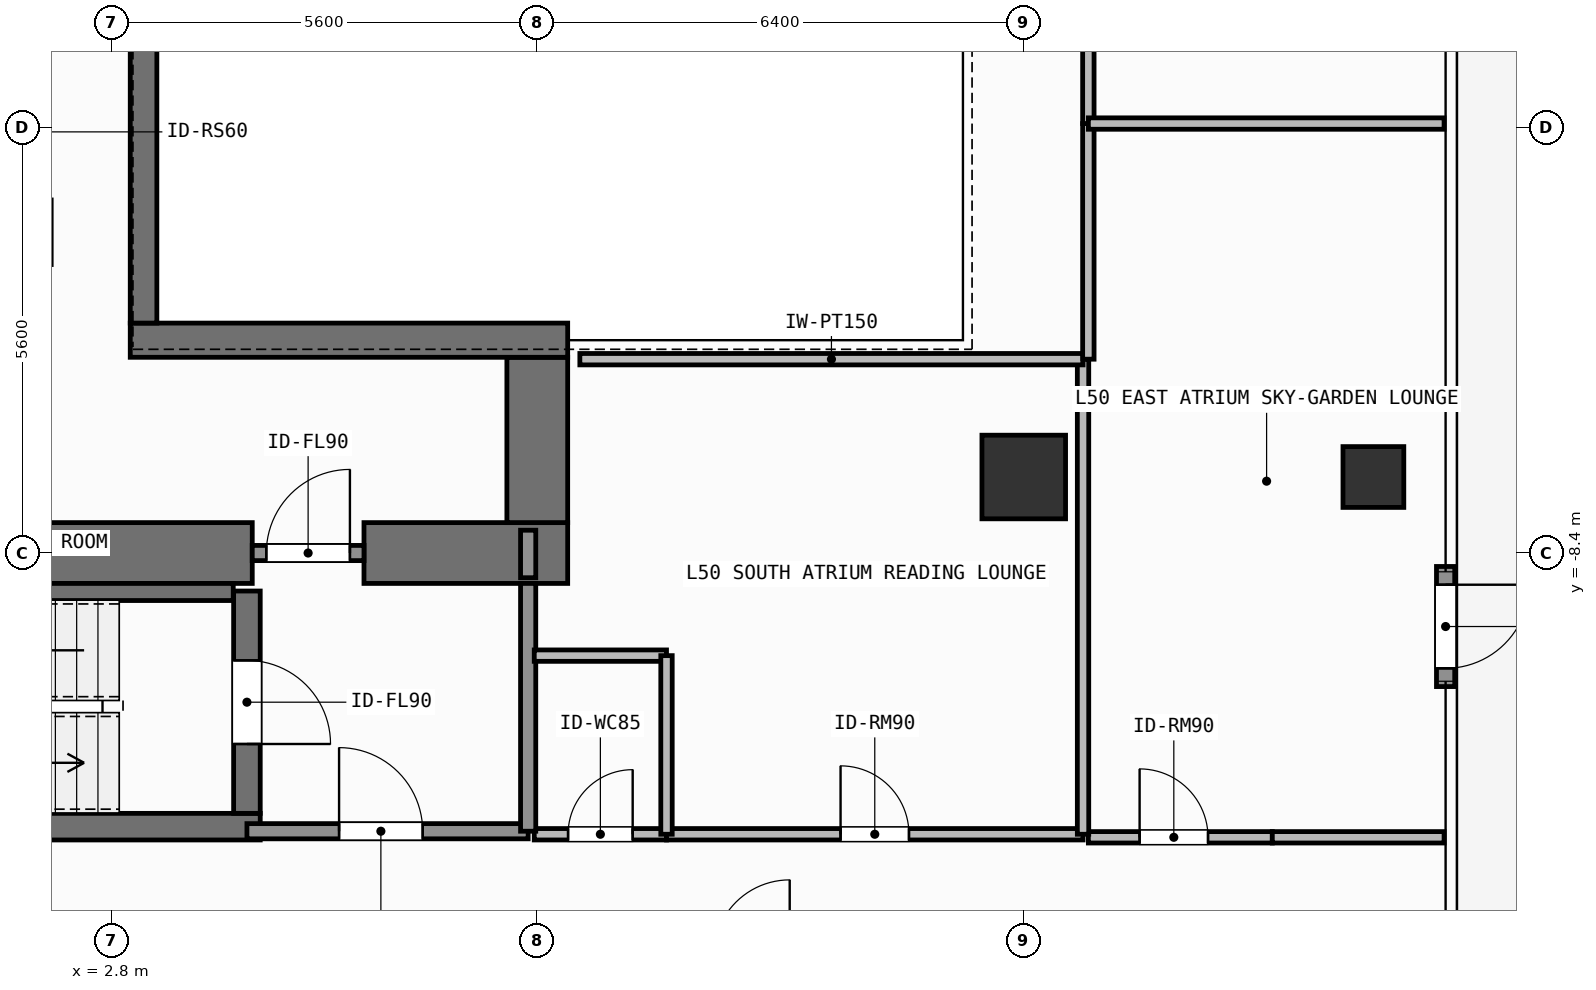
"""IFC4 building model, lengths in metres.
Left out: names, types, materials, properties, quantities, classifications, styles, units other than length and angle.
Written with IfcOpenShell. Run it as: python <this file> out.ifc"""

import sys

from ifc_helpers import new_model, si_unit, direction, frame, frame_2d, origin, origin_2d, place, context, subcontext, project, spatial, rectangle, hollow_rectangle, extrude, element, fill, save


model = new_model("IFC4")
c1 = context("Model", 3, precision=1e-05, world=origin(), true_north=direction((0.0, 1.0)))
c2 = subcontext(c1, "Body", "Model", "MODEL_VIEW")
j1 = project(units=[si_unit("LENGTHUNIT", "METRE"), si_unit("PLANEANGLEUNIT", "RADIAN")], contexts=[c1])
p1 = place(None, origin())
s1 = spatial("IfcSite", under=j1, at=p1, CompositionType="ELEMENT")
p2 = place(p1, origin())
s2 = spatial("IfcBuilding", under=s1, at=p2, CompositionType="ELEMENT")
p3 = place(p2, frame((0.0, 0.0, 203.1)))
s3 = spatial("IfcBuildingStorey", under=s2, at=p3, CompositionType="ELEMENT", Elevation=203.1)
p4 = place(p3, frame((-2.62, -8.4, 0.0), z_axis=(0.0, 0.0, 1.0), x_axis=(1.0, 0.0, 0.0)))
e1 = element("IfcWall", 1, at=p4, inside=s3, PredefinedType="SHEAR", context=c2, shape_type="SweptSolid", body=[
    extrude(rectangle(XDim=7.27, YDim=0.8, at=frame_2d((3.635, 0.0))), origin(), (0.0, 0.0, 1.0), 3.9),
])
p5 = place(p3, frame((6.12, -8.4, 0.0), z_axis=(0.0, 0.0, 1.0), x_axis=(1.0, 0.0, 0.0)))
e2 = element("IfcWall", 2, at=p5, inside=s3, PredefinedType="SHEAR", context=c2, shape_type="SweptSolid", body=[
    extrude(rectangle(XDim=2.68, YDim=0.8, at=frame_2d((1.34, 0.0))), origin(), (0.0, 0.0, 1.0), 3.9),
])
p6 = place(p3, frame((8.4, -8.0, 0.0), z_axis=(0.0, 0.0, 1.0), x_axis=(0.0, 1.0, 0.0)))
e3 = element("IfcWall", 3, at=p6, inside=s3, PredefinedType="SHEAR", context=c2, shape_type="SweptSolid", body=[
    extrude(rectangle(XDim=2.175, YDim=0.8, at=frame_2d((1.087, 0.0))), origin(), (0.0, 0.0, 1.0), 3.9),
])
p7 = place(p3, frame((3.045, -5.6, 0.0), z_axis=(0.0, 0.0, 1.0), x_axis=(1.0, 0.0, 0.0)))
e4 = element("IfcWall", 4, at=p7, inside=s3, PredefinedType="SHEAR", context=c2, shape_type="SweptSolid", body=[
    extrude(rectangle(XDim=5.755, YDim=0.45, at=frame_2d((2.877, 0.0))), origin(), (0.0, 0.0, 1.0), 3.9),
])
p8 = place(p3, frame((3.22, -5.375, 0.0), z_axis=(0.0, 0.0, 1.0), x_axis=(0.0, 1.0, 0.0)))
e5 = element("IfcWall", 5, at=p8, inside=s3, PredefinedType="SHEAR", context=c2, shape_type="SweptSolid", body=[
    extrude(rectangle(XDim=10.75, YDim=0.35, at=frame_2d((5.375, 0.0))), origin(), (0.0, 0.0, 1.0), 3.9),
])
p9 = place(p3, frame((-2.555, -12.0, 0.0), z_axis=(0.0, 0.0, 1.0), x_axis=(1.0, 0.0, 0.0)))
e6 = element("IfcWall", 6, at=p9, inside=s3, PredefinedType="SHEAR", context=c2, shape_type="SweptSolid", body=[
    extrude(rectangle(XDim=7.31, YDim=0.35, at=frame_2d((3.655, 0.0))), origin(), (0.0, 0.0, 1.0), 3.9),
])
p10 = place(p3, frame((-2.2, -8.913, 0.0), z_axis=(0.0, 0.0, 1.0), x_axis=(1.0, 0.0, 0.0)))
e7 = element("IfcWall", 7, at=p10, inside=s3, PredefinedType="SHEAR", context=c2, shape_type="SweptSolid", body=[
    extrude(rectangle(XDim=6.6, YDim=0.225, at=frame_2d((3.3, 0.0))), origin(), (0.0, 0.0, 1.0), 3.9),
])
p11 = place(p3, frame((4.58, -8.9, 0.0), z_axis=(0.0, 0.0, 1.0), x_axis=(0.0, -1.0, 0.0)))
e8 = element("IfcWall", 8, at=p11, inside=s3, PredefinedType="SHEAR", context=c2, shape_type="SweptSolid", body=[
    extrude(rectangle(XDim=2.925, YDim=0.35, at=frame_2d((1.462, 0.0))), origin(), (0.0, 0.0, 1.0), 3.9),
])
p12 = place(p11, frame((0.913, 0.0, 0.0)))
e9 = element("IfcOpeningElement", 9, at=p12, cuts=e8, PredefinedType="OPENING", context=c2, shape_type="SweptSolid", body=[
    extrude(rectangle(XDim=1.1, YDim=2.15, at=frame_2d((0.55, 1.075))), frame((0.0, 0.185, 0.0), z_axis=(0.0, -1.0, 0.0), x_axis=(1.0, 0.0, 0.0)), (0.0, 0.0, 1.0), 0.37),
])
p13 = place(p3, frame((14.8, -7.4, 0.0), z_axis=(0.0, 0.0, 1.0), x_axis=(1.0, 0.0, 0.0)))
e10 = element("IfcColumn", 10, at=p13, inside=s3, PredefinedType="COLUMN", context=c2, shape_type="SweptSolid", body=[
    extrude(rectangle(XDim=1.1, YDim=1.1, at=origin_2d()), origin(), (0.0, 0.0, 1.0), 3.9),
])
p14 = place(p3, frame((19.4, -7.4, 0.0), z_axis=(0.0, 0.0, 1.0), x_axis=(1.0, 0.0, 0.0)))
e11 = element("IfcColumn", 11, at=p14, inside=s3, PredefinedType="COLUMN", context=c2, shape_type="SweptSolid", body=[
    extrude(hollow_rectangle(XDim=0.8, YDim=0.8, WallThickness=0.036, at=origin_2d()), origin(), (0.0, 0.0, 1.0), 3.9),
])
p15 = place(p3, frame((20.35, -8.577, 0.0), z_axis=(0.0, 0.0, 1.0), x_axis=(0.0, -1.0, 0.0)))
e12 = element("IfcWall", 12, at=p15, inside=s3, PredefinedType="SOLIDWALL", context=c2, shape_type="SweptSolid", body=[
    extrude(rectangle(XDim=1.58, YDim=0.24, at=frame_2d((0.79, 0.0))), origin(), (0.0, 0.0, 1.0), 3.68),
])
p16 = place(p15, frame((0.24, 0.0, 0.0)))
e13 = element("IfcOpeningElement", 13, at=p16, cuts=e12, PredefinedType="OPENING", context=c2, shape_type="SweptSolid", body=[
    extrude(rectangle(XDim=1.1, YDim=2.2, at=frame_2d((0.55, 1.1))), frame((0.0, 0.13, 0.0), z_axis=(0.0, -1.0, 0.0), x_axis=(1.0, 0.0, 0.0)), (0.0, 0.0, 1.0), 0.26),
])
p17 = place(p3, frame((4.58, -12.06, 0.0), z_axis=(0.0, 0.0, 1.0), x_axis=(1.0, 0.0, 0.0)))
e14 = element("IfcWall", 14, at=p17, inside=s3, PredefinedType="SOLIDWALL", context=c2, shape_type="SweptSolid", body=[
    extrude(rectangle(XDim=3.7, YDim=0.2, at=frame_2d((1.85, 0.0))), origin(), (0.0, 0.0, 1.0), 3.68),
])
p18 = place(p17, frame((1.212, 0.0, 0.0)))
e15 = element("IfcOpeningElement", 15, at=p18, cuts=e14, PredefinedType="OPENING", context=c2, shape_type="SweptSolid", body=[
    extrude(rectangle(XDim=1.1, YDim=2.15, at=frame_2d((0.55, 1.075))), frame((0.0, 0.11, 0.0), z_axis=(0.0, -1.0, 0.0), x_axis=(1.0, 0.0, 0.0)), (0.0, 0.0, 1.0), 0.22),
])
p19 = place(p3, frame((4.65, -8.4, 0.0), z_axis=(0.0, 0.0, 1.0), x_axis=(1.0, 0.0, 0.0)))
e16 = element("IfcWall", 16, at=p19, inside=s3, PredefinedType="SOLIDWALL", context=c2, shape_type="SweptSolid", body=[
    extrude(rectangle(XDim=1.47, YDim=0.2, at=frame_2d((0.735, 0.0))), origin(), (0.0, 0.0, 1.0), 2.82),
])
p20 = place(p19, frame((0.185, 0.0, 0.0)))
e17 = element("IfcOpeningElement", 17, at=p20, cuts=e16, PredefinedType="OPENING", context=c2, shape_type="SweptSolid", body=[
    extrude(rectangle(XDim=1.1, YDim=2.15, at=frame_2d((0.55, 1.075))), frame((0.0, 0.11, 0.0), z_axis=(0.0, -1.0, 0.0), x_axis=(1.0, 0.0, 0.0)), (0.0, 0.0, 1.0), 0.22),
])
p21 = place(p3, frame((8.36, -12.1, 0.0), z_axis=(0.0, 0.0, 1.0), x_axis=(1.0, 0.0, 0.0)))
e18 = element("IfcWall", 18, at=p21, inside=s3, PredefinedType="PARTITIONING", context=c2, shape_type="SweptSolid", body=[
    extrude(rectangle(XDim=1.74, YDim=0.15, at=frame_2d((0.87, 0.0))), origin(), (0.0, 0.0, 1.0), 3.68),
])
p22 = place(p21, frame((0.445, 0.0, 0.0)))
e19 = element("IfcOpeningElement", 19, at=p22, cuts=e18, PredefinedType="OPENING", context=c2, shape_type="SweptSolid", body=[
    extrude(rectangle(XDim=0.85, YDim=2.1, at=frame_2d((0.425, 1.05))), frame((0.0, 0.085, 0.0), z_axis=(0.0, -1.0, 0.0), x_axis=(1.0, 0.0, 0.0)), (0.0, 0.0, 1.0), 0.17),
])
p23 = place(p3, frame((10.1, -12.1, 0.0), z_axis=(0.0, 0.0, 1.0), x_axis=(1.0, 0.0, 0.0)))
e20 = element("IfcWall", 20, at=p23, inside=s3, PredefinedType="PARTITIONING", context=c2, shape_type="SweptSolid", body=[
    extrude(rectangle(XDim=5.48, YDim=0.15, at=frame_2d((2.74, 0.0))), origin(), (0.0, 0.0, 1.0), 3.68),
])
p24 = place(p23, frame((2.29, 0.0, 0.0)))
e21 = element("IfcOpeningElement", 21, at=p24, cuts=e20, PredefinedType="OPENING", context=c2, shape_type="SweptSolid", body=[
    extrude(rectangle(XDim=0.9, YDim=2.1, at=frame_2d((0.45, 1.05))), frame((0.0, 0.085, 0.0), z_axis=(0.0, -1.0, 0.0), x_axis=(1.0, 0.0, 0.0)), (0.0, 0.0, 1.0), 0.17),
])
p25 = place(p3, frame((15.65, -12.14, 0.0), z_axis=(0.0, 0.0, 1.0), x_axis=(1.0, 0.0, 0.0)))
e22 = element("IfcWall", 22, at=p25, inside=s3, PredefinedType="PARTITIONING", context=c2, shape_type="SweptSolid", body=[
    extrude(rectangle(XDim=2.42, YDim=0.15, at=frame_2d((1.21, 0.0))), origin(), (0.0, 0.0, 1.0), 3.68),
])
p26 = place(p25, frame((0.674, 0.0, 0.0)))
e23 = element("IfcOpeningElement", 23, at=p26, cuts=e22, PredefinedType="OPENING", context=c2, shape_type="SweptSolid", body=[
    extrude(rectangle(XDim=0.9, YDim=2.1, at=frame_2d((0.45, 1.05))), frame((0.0, 0.085, 0.0), z_axis=(0.0, -1.0, 0.0), x_axis=(1.0, 0.0, 0.0)), (0.0, 0.0, 1.0), 0.17),
])
p27 = place(p3, frame((8.28, -12.06, 0.0), z_axis=(0.0, 0.0, 1.0), x_axis=(0.0, 1.0, 0.0)))
e24 = element("IfcWall", 24, at=p27, inside=s3, PredefinedType="SOLIDWALL", context=c2, shape_type="SweptSolid", body=[
    extrude(rectangle(XDim=3.26, YDim=0.2, at=frame_2d((1.63, 0.0))), origin(), (0.0, 0.0, 1.0), 3.68),
])
p28 = place(p3, frame((8.28, -8.725, 0.0), z_axis=(0.0, 0.0, 1.0), x_axis=(0.0, 1.0, 0.0)))
e25 = element("IfcWall", 25, at=p28, inside=s3, PredefinedType="SOLIDWALL", context=c2, shape_type="SweptSolid", body=[
    extrude(rectangle(XDim=0.625, YDim=0.2, at=frame_2d((0.312, 0.0))), origin(), (0.0, 0.0, 1.0), 3.68),
])
p29 = place(p3, frame((8.36, -9.75, 0.0), z_axis=(0.0, 0.0, 1.0), x_axis=(1.0, 0.0, 0.0)))
e26 = element("IfcWall", 26, at=p29, inside=s3, PredefinedType="PARTITIONING", context=c2, shape_type="SweptSolid", body=[
    extrude(rectangle(XDim=1.74, YDim=0.15, at=frame_2d((0.87, 0.0))), origin(), (0.0, 0.0, 1.0), 3.68),
])
p30 = place(p3, frame((10.1, -12.1, 0.0), z_axis=(0.0, 0.0, 1.0), x_axis=(0.0, 1.0, 0.0)))
e27 = element("IfcWall", 27, at=p30, inside=s3, PredefinedType="PARTITIONING", context=c2, shape_type="SweptSolid", body=[
    extrude(rectangle(XDim=2.35, YDim=0.15, at=frame_2d((1.175, 0.0))), origin(), (0.0, 0.0, 1.0), 3.68),
])
p31 = place(p3, frame((15.58, -12.1, 0.0), z_axis=(0.0, 0.0, 1.0), x_axis=(0.0, 1.0, 0.0)))
e28 = element("IfcWall", 28, at=p31, inside=s3, PredefinedType="PARTITIONING", context=c2, shape_type="SweptSolid", body=[
    extrude(rectangle(XDim=6.25, YDim=0.15, at=frame_2d((3.125, 0.0))), origin(), (0.0, 0.0, 1.0), 3.68),
])
p32 = place(p3, frame((8.96, -5.85, 0.0), z_axis=(0.0, 0.0, 1.0), x_axis=(1.0, 0.0, 0.0)))
e29 = element("IfcWall", 29, at=p32, inside=s3, PredefinedType="PARTITIONING", context=c2, shape_type="SweptSolid", body=[
    extrude(rectangle(XDim=6.62, YDim=0.15, at=frame_2d((3.31, 0.0))), origin(), (0.0, 0.0, 1.0), 3.68),
])
p33 = place(p3, frame((15.65, -5.85, 0.0), z_axis=(0.0, 0.0, 1.0), x_axis=(0.0, 1.0, 0.0)))
e30 = element("IfcWall", 30, at=p33, inside=s3, PredefinedType="PARTITIONING", context=c2, shape_type="SweptSolid", body=[
    extrude(rectangle(XDim=3.1, YDim=0.15, at=frame_2d((1.55, 0.0))), origin(), (0.0, 0.0, 1.0), 3.68),
])
p34 = place(p3, frame((15.65, -2.75, 0.0), z_axis=(0.0, 0.0, 1.0), x_axis=(0.0, 1.0, 0.0)))
e31 = element("IfcWall", 31, at=p34, inside=s3, PredefinedType="PARTITIONING", context=c2, shape_type="SweptSolid", body=[
    extrude(rectangle(XDim=8.6, YDim=0.15, at=frame_2d((4.3, 0.0))), origin(), (0.0, 0.0, 1.0), 3.68),
])
p35 = place(p3, frame((15.65, -2.75, 0.0), z_axis=(0.0, 0.0, 1.0), x_axis=(1.0, 0.0, 0.0)))
e32 = element("IfcWall", 32, at=p35, inside=s3, PredefinedType="PARTITIONING", context=c2, shape_type="SweptSolid", body=[
    extrude(rectangle(XDim=4.68, YDim=0.15, at=frame_2d((2.34, 0.0))), origin(), (0.0, 0.0, 1.0), 3.68),
])
p36 = place(p3, frame((18.07, -12.14, 0.0), z_axis=(0.0, 0.0, 1.0), x_axis=(1.0, 0.0, 0.0)))
e33 = element("IfcWall", 33, at=p36, inside=s3, PredefinedType="PARTITIONING", context=c2, shape_type="SweptSolid", body=[
    extrude(rectangle(XDim=2.26, YDim=0.15, at=frame_2d((1.13, 0.0))), origin(), (0.0, 0.0, 1.0), 3.68),
])
p37 = place(p16, origin())
e34 = element("IfcDoor", 34, at=p37, inside=s3, OperationType="SINGLE_SWING_LEFT", PredefinedType="DOOR", context=c2, shape_type="SweptSolid", body=[
    extrude(rectangle(XDim=1.1, YDim=2.2, at=frame_2d((0.55, 1.1))), frame((0.0, 0.025, 0.0), z_axis=(0.0, -1.0, 0.0), x_axis=(1.0, 0.0, 0.0)), (0.0, 0.0, 1.0), 0.05),
])
fill(e13, e34)
p38 = place(p12, origin())
e35 = element("IfcDoor", 35, at=p38, inside=s3, OperationType="SINGLE_SWING_RIGHT", PredefinedType="DOOR", context=c2, shape_type="SweptSolid", body=[
    extrude(rectangle(XDim=1.1, YDim=2.15, at=frame_2d((0.55, 1.075))), frame((0.0, 0.025, 0.0), z_axis=(0.0, -1.0, 0.0), x_axis=(1.0, 0.0, 0.0)), (0.0, 0.0, 1.0), 0.05),
])
fill(e9, e35)
p39 = place(p18, origin())
e36 = element("IfcDoor", 36, at=p39, inside=s3, OperationType="SINGLE_SWING_LEFT", PredefinedType="DOOR", context=c2, shape_type="SweptSolid", body=[
    extrude(rectangle(XDim=1.1, YDim=2.15, at=frame_2d((0.55, 1.075))), frame((0.0, 0.025, 0.0), z_axis=(0.0, -1.0, 0.0), x_axis=(1.0, 0.0, 0.0)), (0.0, 0.0, 1.0), 0.05),
])
fill(e15, e36)
p40 = place(p20, origin())
e37 = element("IfcDoor", 37, at=p40, inside=s3, OperationType="SINGLE_SWING_RIGHT", PredefinedType="DOOR", context=c2, shape_type="SweptSolid", body=[
    extrude(rectangle(XDim=1.1, YDim=2.15, at=frame_2d((0.55, 1.075))), frame((0.0, 0.025, 0.0), z_axis=(0.0, -1.0, 0.0), x_axis=(1.0, 0.0, 0.0)), (0.0, 0.0, 1.0), 0.05),
])
fill(e17, e37)
p41 = place(p22, origin())
e38 = element("IfcDoor", 38, at=p41, inside=s3, OperationType="SINGLE_SWING_RIGHT", PredefinedType="DOOR", context=c2, shape_type="SweptSolid", body=[
    extrude(rectangle(XDim=0.85, YDim=2.1, at=frame_2d((0.425, 1.05))), frame((0.0, 0.025, 0.0), z_axis=(0.0, -1.0, 0.0), x_axis=(1.0, 0.0, 0.0)), (0.0, 0.0, 1.0), 0.05),
])
fill(e19, e38)
p42 = place(p24, origin())
e39 = element("IfcDoor", 39, at=p42, inside=s3, OperationType="SINGLE_SWING_LEFT", PredefinedType="DOOR", context=c2, shape_type="SweptSolid", body=[
    extrude(rectangle(XDim=0.9, YDim=2.1, at=frame_2d((0.45, 1.05))), frame((0.0, 0.025, 0.0), z_axis=(0.0, -1.0, 0.0), x_axis=(1.0, 0.0, 0.0)), (0.0, 0.0, 1.0), 0.05),
])
fill(e21, e39)
p43 = place(p26, origin())
e40 = element("IfcDoor", 40, at=p43, inside=s3, OperationType="SINGLE_SWING_LEFT", PredefinedType="DOOR", context=c2, shape_type="SweptSolid", body=[
    extrude(rectangle(XDim=0.9, YDim=2.1, at=frame_2d((0.45, 1.05))), frame((0.0, 0.025, 0.0), z_axis=(0.0, -1.0, 0.0), x_axis=(1.0, 0.0, 0.0)), (0.0, 0.0, 1.0), 0.05),
])
fill(e23, e40)
save(model, sys.argv[1])
